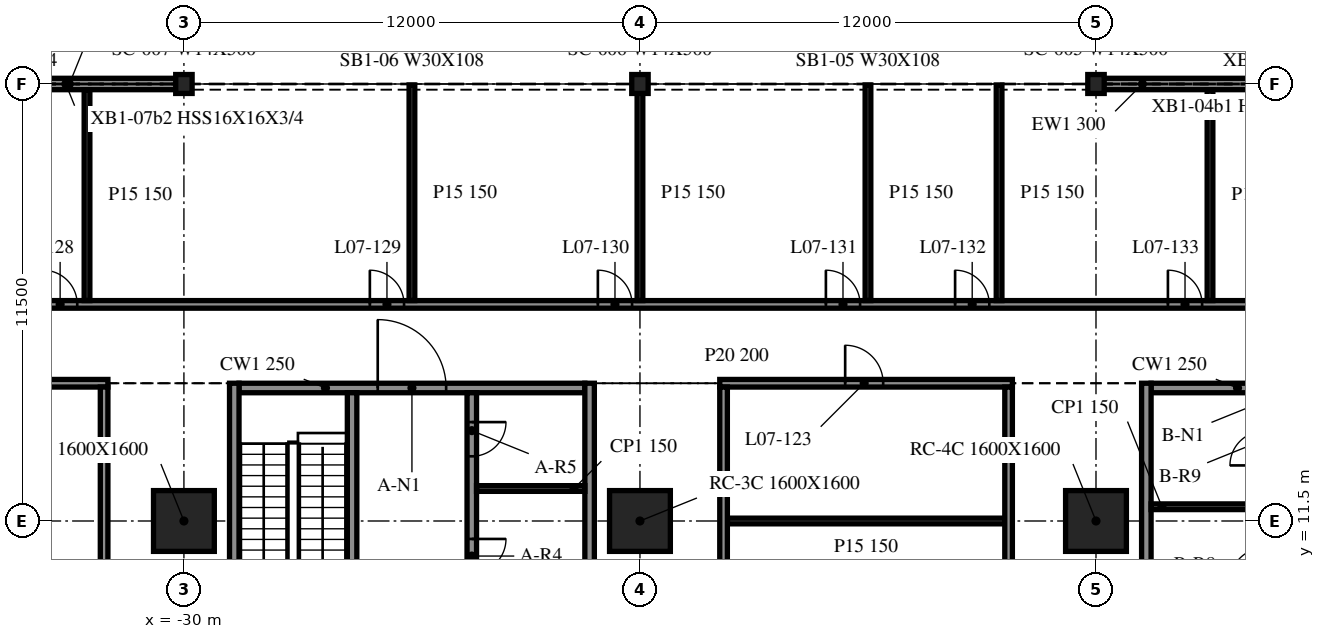
"""IFC4 building model, lengths in metres.
Left out: names, types, materials, properties, quantities, classifications, styles, units other than length and angle.
Written with IfcOpenShell. Run it as: python <this file> out.ifc"""

import sys

from ifc_helpers import new_model, si_unit, direction, frame, frame_2d, origin, origin_2d, place, context, subcontext, project, spatial, rectangle, i_section, extrude, element, fill, save


model = new_model("IFC4")
c1 = context("Model", 3, precision=1e-05, world=origin(), true_north=direction((0.0, 1.0)))
c2 = subcontext(c1, "Body", "Model", "MODEL_VIEW")
j1 = project(units=[si_unit("LENGTHUNIT", "METRE"), si_unit("PLANEANGLEUNIT", "RADIAN")], contexts=[c1])
p1 = place(None, origin())
s1 = spatial("IfcSite", under=j1, at=p1, CompositionType="ELEMENT")
p2 = place(p1, origin())
s2 = spatial("IfcBuilding", under=s1, at=p2, CompositionType="ELEMENT")
p3 = place(p2, frame((0.0, 0.0, 33.0)))
s3 = spatial("IfcBuildingStorey", under=s2, at=p3, CompositionType="ELEMENT", Elevation=33.0)
for number, where, z_axis, x_axis in (
    (1, (-30.0, 11.5, -0.34), (0.0, 0.0, 1.0), (1.0, 0.0, 0.0)),
    (2, (-18.0, 11.5, -0.34), (0.0, 0.0, 1.0), (1.0, 0.0, 0.0)),
    (3, (-6.0, 11.5, -0.34), (0.0, 0.0, 1.0), (1.0, 0.0, 0.0)),
):
    element("IfcColumn", number, at=place(p3, frame(where, z_axis=z_axis, x_axis=x_axis)), inside=s3, PredefinedType="COLUMN", context=c2, shape_type="SweptSolid", body=[
        extrude(rectangle(XDim=1.6, YDim=1.6, at=origin_2d()), origin(), (0.0, 0.0, 1.0), 4.3),
    ])
for number, where, z_axis, x_axis in (
    (4, (-6.0, 23.0, -0.34), (0.0, 0.0, 1.0), (1.0, 0.0, 0.0)),
    (5, (-18.0, 23.0, -0.34), (0.0, 0.0, 1.0), (1.0, 0.0, 0.0)),
    (6, (-30.0, 23.0, -0.34), (0.0, 0.0, 1.0), (1.0, 0.0, 0.0)),
):
    element("IfcColumn", number, at=place(p3, frame(where, z_axis=z_axis, x_axis=x_axis)), inside=s3, PredefinedType="COLUMN", context=c2, shape_type="SweptSolid", body=[
        extrude(i_section(OverallWidth=0.432, OverallDepth=0.498, WebThickness=0.056, FlangeThickness=0.089, at=origin_2d()), origin(), (0.0, 0.0, 1.0), 4.3),
    ])
for number, where, z_axis, x_axis in (
    (7, (5.972, 23.0, 0.0), (0.0, 0.0, 1.0), (-1.0, 0.0, 0.0)),
    (8, (-30.028, 23.0, 0.0), (0.0, 0.0, 1.0), (-1.0, 0.0, 0.0)),
):
    element("IfcWall", number, at=place(p3, frame(where, z_axis=z_axis, x_axis=x_axis)), inside=s3, PredefinedType="NOTDEFINED", context=c2, shape_type="SweptSolid", body=[
        extrude(rectangle(XDim=11.944, YDim=0.3, at=frame_2d((5.972, 0.0))), origin(), (0.0, 0.0, 1.0), 3.203),
    ])
for number, where, z_axis, x_axis in (
    (9, (-28.675, 15.125, 0.0), (0.0, 0.0, 1.0), (0.0, -1.0, 0.0)),
    (10, (-19.325, -9.125, 0.0), (0.0, 0.0, 1.0), (0.0, 1.0, 0.0)),
):
    element("IfcWall", number, at=place(p3, frame(where, z_axis=z_axis, x_axis=x_axis)), inside=s3, PredefinedType="SOLIDWALL", context=c2, shape_type="SweptSolid", body=[
        extrude(rectangle(XDim=24.25, YDim=0.25, at=frame_2d((12.125, 0.0))), origin(), (0.0, 0.0, 1.0), 3.96),
    ])
p4 = place(p3, frame((-28.55, 15.0, 0.0), z_axis=(0.0, 0.0, 1.0), x_axis=(1.0, 0.0, 0.0)))
e11 = element("IfcWall", 11, at=p4, inside=s3, PredefinedType="SOLIDWALL", context=c2, shape_type="SweptSolid", body=[
    extrude(rectangle(XDim=9.1, YDim=0.25, at=frame_2d((4.55, 0.0))), origin(), (0.0, 0.0, 1.0), 3.96),
])
p5 = place(p4, frame((3.65, 0.0, 0.0)))
e12 = element("IfcOpeningElement", 12, at=p5, cuts=e11, PredefinedType="OPENING", context=c2, shape_type="SweptSolid", body=[
    extrude(rectangle(XDim=1.8, YDim=2.1, at=frame_2d((0.9, 1.05))), frame((0.0, 0.135, 0.0), z_axis=(0.0, -1.0, 0.0), x_axis=(1.0, 0.0, 0.0)), (0.0, 0.0, 1.0), 0.27),
])
p6 = place(p3, frame((-25.575, 14.875, 0.0), z_axis=(0.0, 0.0, 1.0), x_axis=(0.0, -1.0, 0.0)))
e13 = element("IfcWall", 13, at=p6, inside=s3, PredefinedType="SOLIDWALL", context=c2, shape_type="SweptSolid", body=[
    extrude(rectangle(XDim=6.25, YDim=0.25, at=frame_2d((3.125, 0.0))), origin(), (0.0, 0.0, 1.0), 3.96),
])
p7 = place(p6, frame((4.85, 0.0, 0.0)))
e14 = element("IfcOpeningElement", 14, at=p7, cuts=e13, PredefinedType="OPENING", context=c2, shape_type="SweptSolid", body=[
    extrude(rectangle(XDim=1.0, YDim=2.1, at=frame_2d((0.5, 1.05))), frame((0.0, 0.135, 0.0), z_axis=(0.0, -1.0, 0.0), x_axis=(1.0, 0.0, 0.0)), (0.0, 0.0, 1.0), 0.27),
])
p8 = place(p3, frame((-22.425, 14.875, 0.0), z_axis=(0.0, 0.0, 1.0), x_axis=(0.0, -1.0, 0.0)))
e15 = element("IfcWall", 15, at=p8, inside=s3, PredefinedType="SOLIDWALL", context=c2, shape_type="SweptSolid", body=[
    extrude(rectangle(XDim=23.75, YDim=0.25, at=frame_2d((11.875, 0.0))), origin(), (0.0, 0.0, 1.0), 3.96),
])
p9 = place(p8, frame((15.45, 0.0, 0.0)))
e16 = element("IfcOpeningElement", 16, at=p9, cuts=e15, PredefinedType="OPENING", context=c2, shape_type="SweptSolid", body=[
    extrude(rectangle(XDim=1.1, YDim=2.1, at=frame_2d((0.55, 1.05))), frame((0.0, 0.135, 0.0), z_axis=(0.0, -1.0, 0.0), x_axis=(1.0, 0.0, 0.0)), (0.0, 0.0, 1.0), 0.27),
])
p10 = place(p8, frame((12.7, 0.0, 0.0)))
e17 = element("IfcOpeningElement", 17, at=p10, cuts=e15, PredefinedType="OPENING", context=c2, shape_type="SweptSolid", body=[
    extrude(rectangle(XDim=1.1, YDim=2.1, at=frame_2d((0.55, 1.05))), frame((0.0, 0.135, 0.0), z_axis=(0.0, -1.0, 0.0), x_axis=(1.0, 0.0, 0.0)), (0.0, 0.0, 1.0), 0.27),
])
p11 = place(p8, frame((20.3, 0.0, 0.0)))
e18 = element("IfcOpeningElement", 18, at=p11, cuts=e15, PredefinedType="OPENING", context=c2, shape_type="SweptSolid", body=[
    extrude(rectangle(XDim=0.9, YDim=2.1, at=frame_2d((0.45, 1.05))), frame((0.0, 0.135, 0.0), z_axis=(0.0, -1.0, 0.0), x_axis=(1.0, 0.0, 0.0)), (0.0, 0.0, 1.0), 0.27),
])
p12 = place(p8, frame((3.847, 0.0, 0.0)))
e19 = element("IfcOpeningElement", 19, at=p12, cuts=e15, PredefinedType="OPENING", context=c2, shape_type="SweptSolid", body=[
    extrude(rectangle(XDim=0.9, YDim=2.1, at=frame_2d((0.45, 1.05))), frame((0.0, 0.135, 0.0), z_axis=(0.0, -1.0, 0.0), x_axis=(1.0, 0.0, 0.0)), (0.0, 0.0, 1.0), 0.27),
])
p13 = place(p8, frame((0.772, 0.0, 0.0)))
e20 = element("IfcOpeningElement", 20, at=p13, cuts=e15, PredefinedType="OPENING", context=c2, shape_type="SweptSolid", body=[
    extrude(rectangle(XDim=0.9, YDim=2.1, at=frame_2d((0.45, 1.05))), frame((0.0, 0.135, 0.0), z_axis=(0.0, -1.0, 0.0), x_axis=(1.0, 0.0, 0.0)), (0.0, 0.0, 1.0), 0.27),
])
p14 = place(p3, frame((-22.3, 12.355, 0.0), z_axis=(0.0, 0.0, 1.0), x_axis=(1.0, 0.0, 0.0)))
e21 = element("IfcWall", 21, at=p14, inside=s3, PredefinedType="PARTITIONING", context=c2, shape_type="SweptSolid", body=[
    extrude(rectangle(XDim=2.85, YDim=0.15, at=frame_2d((1.425, 0.0))), origin(), (0.0, 0.0, 1.0), 3.96),
])
p15 = place(p3, frame((-4.675, 15.125, 0.0), z_axis=(0.0, 0.0, 1.0), x_axis=(0.0, -1.0, 0.0)))
e22 = element("IfcWall", 22, at=p15, inside=s3, PredefinedType="SOLIDWALL", context=c2, shape_type="SweptSolid", body=[
    extrude(rectangle(XDim=24.25, YDim=0.25, at=frame_2d((12.125, 0.0))), origin(), (0.0, 0.0, 1.0), 3.96),
])
p16 = place(p3, frame((-4.55, 15.0, 0.0), z_axis=(0.0, 0.0, 1.0), x_axis=(1.0, 0.0, 0.0)))
e23 = element("IfcWall", 23, at=p16, inside=s3, PredefinedType="SOLIDWALL", context=c2, shape_type="SweptSolid", body=[
    extrude(rectangle(XDim=9.1, YDim=0.25, at=frame_2d((4.55, 0.0))), origin(), (0.0, 0.0, 1.0), 3.96),
])
p17 = place(p16, frame((3.65, 0.0, 0.0)))
e24 = element("IfcOpeningElement", 24, at=p17, cuts=e23, PredefinedType="OPENING", context=c2, shape_type="SweptSolid", body=[
    extrude(rectangle(XDim=1.8, YDim=2.1, at=frame_2d((0.9, 1.05))), frame((0.0, 0.135, 0.0), z_axis=(0.0, -1.0, 0.0), x_axis=(1.0, 0.0, 0.0)), (0.0, 0.0, 1.0), 0.27),
])
p18 = place(p3, frame((-4.55, 11.875, 0.0), z_axis=(0.0, 0.0, 1.0), x_axis=(1.0, 0.0, 0.0)))
e25 = element("IfcWall", 25, at=p18, inside=s3, PredefinedType="PARTITIONING", context=c2, shape_type="SweptSolid", body=[
    extrude(rectangle(XDim=2.85, YDim=0.15, at=frame_2d((1.425, 0.0))), origin(), (0.0, 0.0, 1.0), 3.96),
])
p19 = place(p3, frame((-15.7, 11.5, 0.0), z_axis=(0.0, 0.0, 1.0), x_axis=(1.0, 0.0, 0.0)))
e26 = element("IfcWall", 26, at=p19, inside=s3, PredefinedType="PARTITIONING", context=c2, shape_type="SweptSolid", body=[
    extrude(rectangle(XDim=7.3, YDim=0.15, at=frame_2d((3.65, 0.0))), origin(), (0.0, 0.0, 1.0), 3.96),
])
p20 = place(p3, frame((-45.95, 15.125, 0.0), z_axis=(0.0, 0.0, 1.0), x_axis=(1.0, 0.0, 0.0)))
e27 = element("IfcWall", 27, at=p20, inside=s3, PredefinedType="PARTITIONING", context=c2, shape_type="SweptSolid", body=[
    extrude(rectangle(XDim=13.95, YDim=0.2, at=frame_2d((6.975, 0.0))), origin(), (0.0, 0.0, 1.0), 3.96),
])
p21 = place(p3, frame((-15.9, 15.125, 0.0), z_axis=(0.0, 0.0, 1.0), x_axis=(1.0, 0.0, 0.0)))
e28 = element("IfcWall", 28, at=p21, inside=s3, PredefinedType="PARTITIONING", context=c2, shape_type="SweptSolid", body=[
    extrude(rectangle(XDim=7.7, YDim=0.2, at=frame_2d((3.85, 0.0))), origin(), (0.0, 0.0, 1.0), 3.96),
])
p22 = place(p21, frame((3.3, 0.0, 0.0)))
e29 = element("IfcOpeningElement", 29, at=p22, cuts=e28, PredefinedType="OPENING", context=c2, shape_type="SweptSolid", body=[
    extrude(rectangle(XDim=1.0, YDim=2.1, at=frame_2d((0.5, 1.05))), frame((0.0, 0.11, 0.0), z_axis=(0.0, -1.0, 0.0), x_axis=(1.0, 0.0, 0.0)), (0.0, 0.0, 1.0), 0.22),
])
p23 = place(p3, frame((-47.807, 17.2, 0.0), z_axis=(0.0, 0.0, 1.0), x_axis=(1.0, 0.0, 0.0)))
e30 = element("IfcWall", 30, at=p23, inside=s3, PredefinedType="PARTITIONING", context=c2, shape_type="SweptSolid", body=[
    extrude(rectangle(XDim=95.615, YDim=0.2, at=frame_2d((47.807, 0.0))), origin(), (0.0, 0.0, 1.0), 3.96),
])
p24 = place(p23, frame((4.7, 0.0, 0.0)))
e31 = element("IfcOpeningElement", 31, at=p24, cuts=e30, PredefinedType="OPENING", context=c2, shape_type="SweptSolid", body=[
    extrude(rectangle(XDim=0.9, YDim=2.1, at=frame_2d((0.45, 1.05))), frame((0.0, 0.11, 0.0), z_axis=(0.0, -1.0, 0.0), x_axis=(1.0, 0.0, 0.0)), (0.0, 0.0, 1.0), 0.22),
])
p25 = place(p23, frame((8.1, 0.0, 0.0)))
e32 = element("IfcOpeningElement", 32, at=p25, cuts=e30, PredefinedType="OPENING", context=c2, shape_type="SweptSolid", body=[
    extrude(rectangle(XDim=0.9, YDim=2.1, at=frame_2d((0.45, 1.05))), frame((0.0, 0.11, 0.0), z_axis=(0.0, -1.0, 0.0), x_axis=(1.0, 0.0, 0.0)), (0.0, 0.0, 1.0), 0.22),
])
p26 = place(p23, frame((14.1, 0.0, 0.0)))
e33 = element("IfcOpeningElement", 33, at=p26, cuts=e30, PredefinedType="OPENING", context=c2, shape_type="SweptSolid", body=[
    extrude(rectangle(XDim=0.9, YDim=2.1, at=frame_2d((0.45, 1.05))), frame((0.0, 0.11, 0.0), z_axis=(0.0, -1.0, 0.0), x_axis=(1.0, 0.0, 0.0)), (0.0, 0.0, 1.0), 0.22),
])
p27 = place(p23, frame((22.7, 0.0, 0.0)))
e34 = element("IfcOpeningElement", 34, at=p27, cuts=e30, PredefinedType="OPENING", context=c2, shape_type="SweptSolid", body=[
    extrude(rectangle(XDim=0.9, YDim=2.1, at=frame_2d((0.45, 1.05))), frame((0.0, 0.11, 0.0), z_axis=(0.0, -1.0, 0.0), x_axis=(1.0, 0.0, 0.0)), (0.0, 0.0, 1.0), 0.22),
])
p28 = place(p23, frame((28.7, 0.0, 0.0)))
e35 = element("IfcOpeningElement", 35, at=p28, cuts=e30, PredefinedType="OPENING", context=c2, shape_type="SweptSolid", body=[
    extrude(rectangle(XDim=0.9, YDim=2.1, at=frame_2d((0.45, 1.05))), frame((0.0, 0.11, 0.0), z_axis=(0.0, -1.0, 0.0), x_axis=(1.0, 0.0, 0.0)), (0.0, 0.0, 1.0), 0.22),
])
p29 = place(p23, frame((34.7, 0.0, 0.0)))
e36 = element("IfcOpeningElement", 36, at=p29, cuts=e30, PredefinedType="OPENING", context=c2, shape_type="SweptSolid", body=[
    extrude(rectangle(XDim=0.9, YDim=2.1, at=frame_2d((0.45, 1.05))), frame((0.0, 0.11, 0.0), z_axis=(0.0, -1.0, 0.0), x_axis=(1.0, 0.0, 0.0)), (0.0, 0.0, 1.0), 0.22),
])
p30 = place(p23, frame((38.1, 0.0, 0.0)))
e37 = element("IfcOpeningElement", 37, at=p30, cuts=e30, PredefinedType="OPENING", context=c2, shape_type="SweptSolid", body=[
    extrude(rectangle(XDim=0.9, YDim=2.1, at=frame_2d((0.45, 1.05))), frame((0.0, 0.11, 0.0), z_axis=(0.0, -1.0, 0.0), x_axis=(1.0, 0.0, 0.0)), (0.0, 0.0, 1.0), 0.22),
])
p31 = place(p23, frame((43.7, 0.0, 0.0)))
e38 = element("IfcOpeningElement", 38, at=p31, cuts=e30, PredefinedType="OPENING", context=c2, shape_type="SweptSolid", body=[
    extrude(rectangle(XDim=0.9, YDim=2.1, at=frame_2d((0.45, 1.05))), frame((0.0, 0.11, 0.0), z_axis=(0.0, -1.0, 0.0), x_axis=(1.0, 0.0, 0.0)), (0.0, 0.0, 1.0), 0.22),
])
p32 = place(p23, frame((47.3, 0.0, 0.0)))
e39 = element("IfcOpeningElement", 39, at=p32, cuts=e30, PredefinedType="OPENING", context=c2, shape_type="SweptSolid", body=[
    extrude(rectangle(XDim=0.9, YDim=2.1, at=frame_2d((0.45, 1.05))), frame((0.0, 0.11, 0.0), z_axis=(0.0, -1.0, 0.0), x_axis=(1.0, 0.0, 0.0)), (0.0, 0.0, 1.0), 0.22),
])
p33 = place(p23, frame((54.1, 0.0, 0.0)))
e40 = element("IfcOpeningElement", 40, at=p33, cuts=e30, PredefinedType="OPENING", context=c2, shape_type="SweptSolid", body=[
    extrude(rectangle(XDim=0.9, YDim=2.1, at=frame_2d((0.45, 1.05))), frame((0.0, 0.11, 0.0), z_axis=(0.0, -1.0, 0.0), x_axis=(1.0, 0.0, 0.0)), (0.0, 0.0, 1.0), 0.22),
])
p34 = place(p23, frame((60.1, 0.0, 0.0)))
e41 = element("IfcOpeningElement", 41, at=p34, cuts=e30, PredefinedType="OPENING", context=c2, shape_type="SweptSolid", body=[
    extrude(rectangle(XDim=0.9, YDim=2.1, at=frame_2d((0.45, 1.05))), frame((0.0, 0.11, 0.0), z_axis=(0.0, -1.0, 0.0), x_axis=(1.0, 0.0, 0.0)), (0.0, 0.0, 1.0), 0.22),
])
p35 = place(p23, frame((66.1, 0.0, 0.0)))
e42 = element("IfcOpeningElement", 42, at=p35, cuts=e30, PredefinedType="OPENING", context=c2, shape_type="SweptSolid", body=[
    extrude(rectangle(XDim=0.9, YDim=2.1, at=frame_2d((0.45, 1.05))), frame((0.0, 0.11, 0.0), z_axis=(0.0, -1.0, 0.0), x_axis=(1.0, 0.0, 0.0)), (0.0, 0.0, 1.0), 0.22),
])
p36 = place(p23, frame((69.1, 0.0, 0.0)))
e43 = element("IfcOpeningElement", 43, at=p36, cuts=e30, PredefinedType="OPENING", context=c2, shape_type="SweptSolid", body=[
    extrude(rectangle(XDim=0.9, YDim=2.1, at=frame_2d((0.45, 1.05))), frame((0.0, 0.11, 0.0), z_axis=(0.0, -1.0, 0.0), x_axis=(1.0, 0.0, 0.0)), (0.0, 0.0, 1.0), 0.22),
])
p37 = place(p23, frame((75.1, 0.0, 0.0)))
e44 = element("IfcOpeningElement", 44, at=p37, cuts=e30, PredefinedType="OPENING", context=c2, shape_type="SweptSolid", body=[
    extrude(rectangle(XDim=0.9, YDim=2.1, at=frame_2d((0.45, 1.05))), frame((0.0, 0.11, 0.0), z_axis=(0.0, -1.0, 0.0), x_axis=(1.0, 0.0, 0.0)), (0.0, 0.0, 1.0), 0.22),
])
p38 = place(p23, frame((84.1, 0.0, 0.0)))
e45 = element("IfcOpeningElement", 45, at=p38, cuts=e30, PredefinedType="OPENING", context=c2, shape_type="SweptSolid", body=[
    extrude(rectangle(XDim=0.9, YDim=2.1, at=frame_2d((0.45, 1.05))), frame((0.0, 0.11, 0.0), z_axis=(0.0, -1.0, 0.0), x_axis=(1.0, 0.0, 0.0)), (0.0, 0.0, 1.0), 0.22),
])
p39 = place(p23, frame((90.1, 0.0, 0.0)))
e46 = element("IfcOpeningElement", 46, at=p39, cuts=e30, PredefinedType="OPENING", context=c2, shape_type="SweptSolid", body=[
    extrude(rectangle(XDim=0.9, YDim=2.1, at=frame_2d((0.45, 1.05))), frame((0.0, 0.11, 0.0), z_axis=(0.0, -1.0, 0.0), x_axis=(1.0, 0.0, 0.0)), (0.0, 0.0, 1.0), 0.22),
])
p40 = place(p3, frame((-32.55, 17.3, 0.0), z_axis=(0.0, 0.0, 1.0), x_axis=(0.0, 1.0, 0.0)))
e47 = element("IfcWall", 47, at=p40, inside=s3, PredefinedType="PARTITIONING", context=c2, shape_type="SweptSolid", body=[
    extrude(rectangle(XDim=5.55, YDim=0.15, at=frame_2d((2.775, 0.0))), origin(), (0.0, 0.0, 1.0), 3.96),
])
p41 = place(p3, frame((-32.1, -9.025, 0.0), z_axis=(0.0, 0.0, 1.0), x_axis=(0.0, 1.0, 0.0)))
e48 = element("IfcWall", 48, at=p41, inside=s3, PredefinedType="PARTITIONING", context=c2, shape_type="SweptSolid", body=[
    extrude(rectangle(XDim=24.05, YDim=0.2, at=frame_2d((12.025, 0.0))), origin(), (0.0, 0.0, 1.0), 3.96),
])
p42 = place(p41, frame((11.5, 0.0, 0.0)))
e49 = element("IfcOpeningElement", 49, at=p42, cuts=e48, PredefinedType="OPENING", context=c2, shape_type="SweptSolid", body=[
    extrude(rectangle(XDim=1.0, YDim=2.1, at=frame_2d((0.5, 1.05))), frame((0.0, 0.11, 0.0), z_axis=(0.0, -1.0, 0.0), x_axis=(1.0, 0.0, 0.0)), (0.0, 0.0, 1.0), 0.22),
])
for number, where, z_axis, x_axis in (
    (50, (-24.0, 17.3, 0.0), (0.0, 0.0, 1.0), (0.0, 1.0, 0.0)),
    (51, (-18.0, 17.3, 0.0), (0.0, 0.0, 1.0), (0.0, 1.0, 0.0)),
):
    element("IfcWall", number, at=place(p3, frame(where, z_axis=z_axis, x_axis=x_axis)), inside=s3, PredefinedType="PARTITIONING", context=c2, shape_type="SweptSolid", body=[
        extrude(rectangle(XDim=5.675, YDim=0.15, at=frame_2d((2.837, 0.0))), origin(), (0.0, 0.0, 1.0), 3.96),
    ])
p43 = place(p3, frame((-15.8, -9.025, 0.0), z_axis=(0.0, 0.0, 1.0), x_axis=(0.0, 1.0, 0.0)))
e52 = element("IfcWall", 52, at=p43, inside=s3, PredefinedType="PARTITIONING", context=c2, shape_type="SweptSolid", body=[
    extrude(rectangle(XDim=24.05, YDim=0.2, at=frame_2d((12.025, 0.0))), origin(), (0.0, 0.0, 1.0), 3.96),
])
p44 = place(p43, frame((11.5, 0.0, 0.0)))
e53 = element("IfcOpeningElement", 53, at=p44, cuts=e52, PredefinedType="OPENING", context=c2, shape_type="SweptSolid", body=[
    extrude(rectangle(XDim=1.0, YDim=2.1, at=frame_2d((0.5, 1.05))), frame((0.0, 0.11, 0.0), z_axis=(0.0, -1.0, 0.0), x_axis=(1.0, 0.0, 0.0)), (0.0, 0.0, 1.0), 0.22),
])
for number, where, z_axis, x_axis in (
    (54, (-12.0, 17.3, 0.0), (0.0, 0.0, 1.0), (0.0, 1.0, 0.0)),
    (55, (-8.55, 17.3, 0.0), (0.0, 0.0, 1.0), (0.0, 1.0, 0.0)),
):
    element("IfcWall", number, at=place(p3, frame(where, z_axis=z_axis, x_axis=x_axis)), inside=s3, PredefinedType="PARTITIONING", context=c2, shape_type="SweptSolid", body=[
        extrude(rectangle(XDim=5.675, YDim=0.15, at=frame_2d((2.837, 0.0))), origin(), (0.0, 0.0, 1.0), 3.96),
    ])
p45 = place(p3, frame((-8.3, -9.025, 0.0), z_axis=(0.0, 0.0, 1.0), x_axis=(0.0, 1.0, 0.0)))
e56 = element("IfcWall", 56, at=p45, inside=s3, PredefinedType="PARTITIONING", context=c2, shape_type="SweptSolid", body=[
    extrude(rectangle(XDim=24.05, YDim=0.2, at=frame_2d((12.025, 0.0))), origin(), (0.0, 0.0, 1.0), 3.96),
])
p46 = place(p3, frame((-3.0, 17.3, 0.0), z_axis=(0.0, 0.0, 1.0), x_axis=(0.0, 1.0, 0.0)))
e57 = element("IfcWall", 57, at=p46, inside=s3, PredefinedType="PARTITIONING", context=c2, shape_type="SweptSolid", body=[
    extrude(rectangle(XDim=5.55, YDim=0.15, at=frame_2d((2.775, 0.0))), origin(), (0.0, 0.0, 1.0), 3.96),
])
p47 = place(p5, origin())
e58 = element("IfcDoor", 58, at=p47, inside=s3, OperationType="DOUBLE_DOOR_SINGLE_SWING", PredefinedType="DOOR", context=c2, shape_type="SweptSolid", body=[
    extrude(rectangle(XDim=1.8, YDim=2.1, at=frame_2d((0.9, 1.05))), frame((0.0, 0.025, 0.0), z_axis=(0.0, -1.0, 0.0), x_axis=(1.0, 0.0, 0.0)), (0.0, 0.0, 1.0), 0.05),
])
fill(e12, e58)
p48 = place(p12, origin())
e59 = element("IfcDoor", 59, at=p48, inside=s3, OperationType="SINGLE_SWING_RIGHT", PredefinedType="DOOR", context=c2, shape_type="SweptSolid", body=[
    extrude(rectangle(XDim=0.9, YDim=2.1, at=frame_2d((0.45, 1.05))), frame((0.0, 0.025, 0.0), z_axis=(0.0, -1.0, 0.0), x_axis=(1.0, 0.0, 0.0)), (0.0, 0.0, 1.0), 0.05),
])
fill(e19, e59)
p49 = place(p13, origin())
e60 = element("IfcDoor", 60, at=p49, inside=s3, OperationType="SINGLE_SWING_LEFT", PredefinedType="DOOR", context=c2, shape_type="SweptSolid", body=[
    extrude(rectangle(XDim=0.9, YDim=2.1, at=frame_2d((0.45, 1.05))), frame((0.0, 0.025, 0.0), z_axis=(0.0, -1.0, 0.0), x_axis=(1.0, 0.0, 0.0)), (0.0, 0.0, 1.0), 0.05),
])
fill(e20, e60)
p50 = place(p22, origin())
e61 = element("IfcDoor", 61, at=p50, inside=s3, OperationType="SINGLE_SWING_RIGHT", PredefinedType="DOOR", context=c2, shape_type="SweptSolid", body=[
    extrude(rectangle(XDim=1.0, YDim=2.1, at=frame_2d((0.5, 1.05))), frame((0.0, 0.025, 0.0), z_axis=(0.0, -1.0, 0.0), x_axis=(1.0, 0.0, 0.0)), (0.0, 0.0, 1.0), 0.05),
])
fill(e29, e61)
p51 = place(p26, origin())
e62 = element("IfcDoor", 62, at=p51, inside=s3, OperationType="SINGLE_SWING_LEFT", PredefinedType="DOOR", context=c2, shape_type="SweptSolid", body=[
    extrude(rectangle(XDim=0.9, YDim=2.1, at=frame_2d((0.45, 1.05))), frame((0.0, 0.025, 0.0), z_axis=(0.0, -1.0, 0.0), x_axis=(1.0, 0.0, 0.0)), (0.0, 0.0, 1.0), 0.05),
])
fill(e33, e62)
p52 = place(p27, origin())
e63 = element("IfcDoor", 63, at=p52, inside=s3, OperationType="SINGLE_SWING_LEFT", PredefinedType="DOOR", context=c2, shape_type="SweptSolid", body=[
    extrude(rectangle(XDim=0.9, YDim=2.1, at=frame_2d((0.45, 1.05))), frame((0.0, 0.025, 0.0), z_axis=(0.0, -1.0, 0.0), x_axis=(1.0, 0.0, 0.0)), (0.0, 0.0, 1.0), 0.05),
])
fill(e34, e63)
p53 = place(p28, origin())
e64 = element("IfcDoor", 64, at=p53, inside=s3, OperationType="SINGLE_SWING_LEFT", PredefinedType="DOOR", context=c2, shape_type="SweptSolid", body=[
    extrude(rectangle(XDim=0.9, YDim=2.1, at=frame_2d((0.45, 1.05))), frame((0.0, 0.025, 0.0), z_axis=(0.0, -1.0, 0.0), x_axis=(1.0, 0.0, 0.0)), (0.0, 0.0, 1.0), 0.05),
])
fill(e35, e64)
p54 = place(p29, origin())
e65 = element("IfcDoor", 65, at=p54, inside=s3, OperationType="SINGLE_SWING_LEFT", PredefinedType="DOOR", context=c2, shape_type="SweptSolid", body=[
    extrude(rectangle(XDim=0.9, YDim=2.1, at=frame_2d((0.45, 1.05))), frame((0.0, 0.025, 0.0), z_axis=(0.0, -1.0, 0.0), x_axis=(1.0, 0.0, 0.0)), (0.0, 0.0, 1.0), 0.05),
])
fill(e36, e65)
p55 = place(p30, origin())
e66 = element("IfcDoor", 66, at=p55, inside=s3, OperationType="SINGLE_SWING_LEFT", PredefinedType="DOOR", context=c2, shape_type="SweptSolid", body=[
    extrude(rectangle(XDim=0.9, YDim=2.1, at=frame_2d((0.45, 1.05))), frame((0.0, 0.025, 0.0), z_axis=(0.0, -1.0, 0.0), x_axis=(1.0, 0.0, 0.0)), (0.0, 0.0, 1.0), 0.05),
])
fill(e37, e66)
p56 = place(p31, origin())
e67 = element("IfcDoor", 67, at=p56, inside=s3, OperationType="SINGLE_SWING_LEFT", PredefinedType="DOOR", context=c2, shape_type="SweptSolid", body=[
    extrude(rectangle(XDim=0.9, YDim=2.1, at=frame_2d((0.45, 1.05))), frame((0.0, 0.025, 0.0), z_axis=(0.0, -1.0, 0.0), x_axis=(1.0, 0.0, 0.0)), (0.0, 0.0, 1.0), 0.05),
])
fill(e38, e67)
save(model, sys.argv[1])
